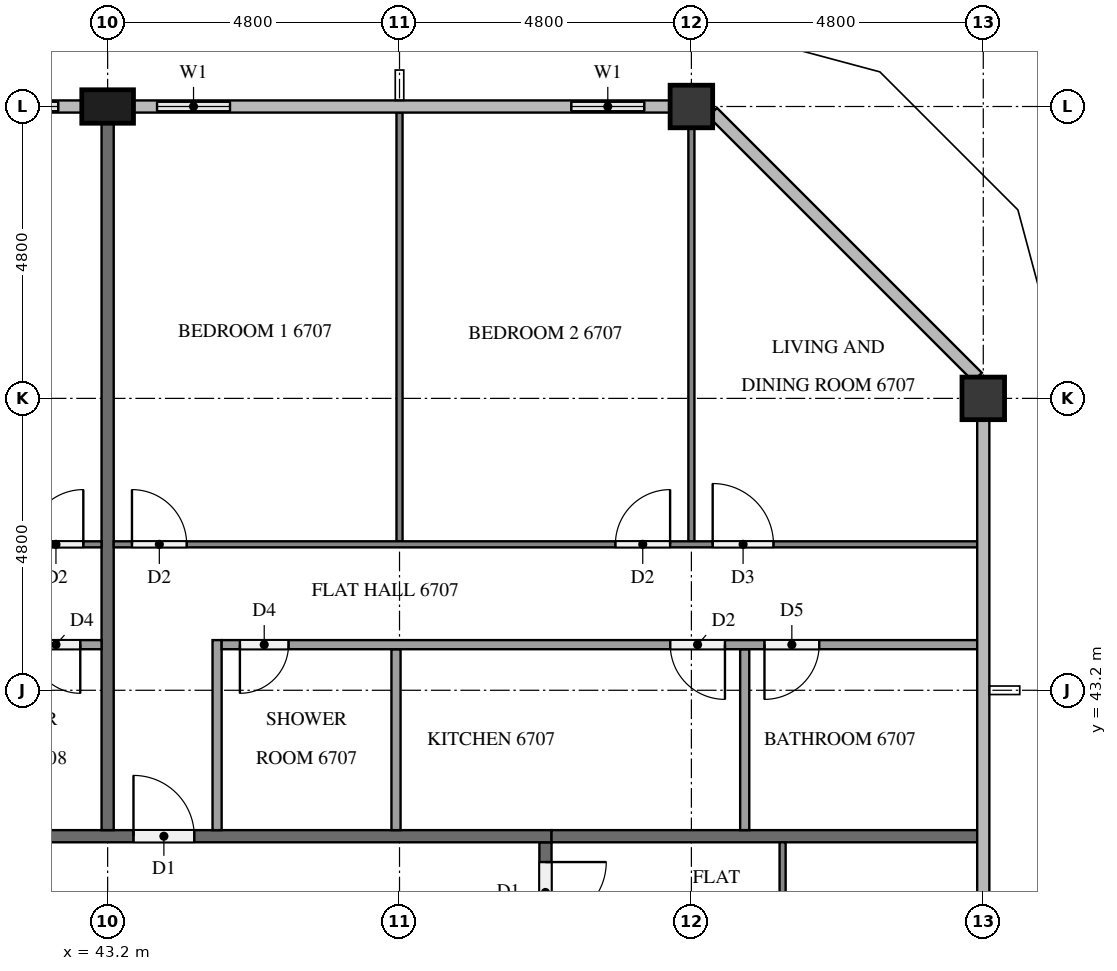
"""IFC4 building model, lengths in metres.
Left out: names, types, materials, properties, quantities, classifications, styles, units other than length and angle.
Written with IfcOpenShell. Run it as: python <this file> out.ifc"""

import sys

from ifc_helpers import new_model, si_unit, direction, frame, frame_2d, origin, origin_2d, place, context, subcontext, project, spatial, rectangle, extrude, element, fill, save


model = new_model("IFC4")
c1 = context("Model", 3, precision=1e-05, world=origin(), true_north=direction((0.0, 1.0)))
c2 = subcontext(c1, "Body", "Model", "MODEL_VIEW")
j1 = project(units=[si_unit("LENGTHUNIT", "METRE"), si_unit("PLANEANGLEUNIT", "RADIAN")], contexts=[c1])
p1 = place(None, origin())
s1 = spatial("IfcSite", under=j1, at=p1, CompositionType="ELEMENT")
p2 = place(p1, origin())
s2 = spatial("IfcBuilding", under=s1, at=p2, CompositionType="ELEMENT")
p3 = place(p2, frame((0.0, 0.0, 256.2)))
s3 = spatial("IfcBuildingStorey", under=s2, at=p3, CompositionType="ELEMENT", Elevation=256.2)
for number, where, z_axis, x_axis in (
    (1, (57.6, 48.0, 0.0), (0.0, 0.0, 1.0), (1.0, 0.0, 0.0)),
    (2, (52.8, 52.8, 0.0), (0.0, 0.0, 1.0), (1.0, 0.0, 0.0)),
):
    element("IfcColumn", number, at=place(p3, frame(where, z_axis=z_axis, x_axis=x_axis)), inside=s3, PredefinedType="COLUMN", context=c2, shape_type="SweptSolid", body=[
        extrude(rectangle(XDim=0.7, YDim=0.7, at=origin_2d()), origin(), (0.0, 0.0, 1.0), 3.2),
    ])
p4 = place(p3, frame((43.2, 52.8, 0.0), z_axis=(0.0, 0.0, 1.0), x_axis=(1.0, 0.0, 0.0)))
e3 = element("IfcColumn", 3, at=p4, inside=s3, PredefinedType="COLUMN", context=c2, shape_type="SweptSolid", body=[
    extrude(rectangle(XDim=0.85, YDim=0.55, at=origin_2d()), origin(), (0.0, 0.0, 1.0), 3.2),
])
p5 = place(p3, frame((52.45, 52.8, 0.0), z_axis=(0.0, 0.0, 1.0), x_axis=(-1.0, 0.0, 0.0)))
e4 = element("IfcWall", 4, at=p5, inside=s3, PredefinedType="SOLIDWALL", context=c2, shape_type="SweptSolid", body=[
    extrude(rectangle(XDim=2.05, YDim=0.15, at=frame_2d((1.025, 0.0))), origin(), (0.0, 0.0, 1.0), 3.2),
])
p6 = place(p5, frame((0.425, 0.0, 0.9)))
e5 = element("IfcOpeningElement", 5, at=p6, cuts=e4, PredefinedType="OPENING", context=c2, shape_type="SweptSolid", body=[
    extrude(rectangle(XDim=1.2, YDim=1.4, at=frame_2d((0.6, 0.7))), frame((0.0, 0.085, 0.0), z_axis=(0.0, -1.0, 0.0), x_axis=(1.0, 0.0, 0.0)), (0.0, 0.0, 1.0), 0.17),
])
p7 = place(p3, frame((45.6, 52.8, 0.0), z_axis=(0.0, 0.0, 1.0), x_axis=(-1.0, 0.0, 0.0)))
e6 = element("IfcWall", 6, at=p7, inside=s3, PredefinedType="SOLIDWALL", context=c2, shape_type="SweptSolid", body=[
    extrude(rectangle(XDim=1.975, YDim=0.15, at=frame_2d((0.988, 0.0))), origin(), (0.0, 0.0, 1.0), 3.2),
])
p8 = place(p7, frame((0.387, 0.0, 0.9)))
e7 = element("IfcOpeningElement", 7, at=p8, cuts=e6, PredefinedType="OPENING", context=c2, shape_type="SweptSolid", body=[
    extrude(rectangle(XDim=1.2, YDim=1.4, at=frame_2d((0.6, 0.7))), frame((0.0, 0.085, 0.0), z_axis=(0.0, -1.0, 0.0), x_axis=(1.0, 0.0, 0.0)), (0.0, 0.0, 1.0), 0.17),
])
p9 = place(p3, frame((42.775, 52.8, 0.0), z_axis=(0.0, 0.0, 1.0), x_axis=(-1.0, 0.0, 0.0)))
e8 = element("IfcWall", 8, at=p9, inside=s3, PredefinedType="SOLIDWALL", context=c2, shape_type="SweptSolid", body=[
    extrude(rectangle(XDim=1.975, YDim=0.15, at=frame_2d((0.987, 0.0))), origin(), (0.0, 0.0, 1.0), 3.2),
])
p10 = place(p9, frame((0.387, 0.0, 0.9)))
e9 = element("IfcOpeningElement", 9, at=p10, cuts=e8, PredefinedType="OPENING", context=c2, shape_type="SweptSolid", body=[
    extrude(rectangle(XDim=1.2, YDim=1.4, at=frame_2d((0.6, 0.7))), frame((0.0, 0.085, 0.0), z_axis=(0.0, -1.0, 0.0), x_axis=(1.0, 0.0, 0.0)), (0.0, 0.0, 1.0), 0.17),
])
p11 = place(p3, frame((50.4, 40.7, 0.0), z_axis=(0.0, 0.0, 1.0), x_axis=(0.0, -1.0, 0.0)))
e10 = element("IfcWall", 10, at=p11, inside=s3, PredefinedType="PARTITIONING", context=c2, shape_type="SweptSolid", body=[
    extrude(rectangle(XDim=28.6, YDim=0.2, at=frame_2d((14.3, 0.0))), origin(), (0.0, 0.0, 1.0), 3.2),
])
p12 = place(p11, frame((19.525, 0.0, 0.0)))
e11 = element("IfcOpeningElement", 11, at=p12, cuts=e10, PredefinedType="OPENING", context=c2, shape_type="SweptSolid", body=[
    extrude(rectangle(XDim=1.0, YDim=2.1, at=frame_2d((0.5, 1.05))), frame((0.0, 0.11, 0.0), z_axis=(0.0, -1.0, 0.0), x_axis=(1.0, 0.0, 0.0)), (0.0, 0.0, 1.0), 0.22),
])
p13 = place(p11, frame((17.675, 0.0, 0.0)))
e12 = element("IfcOpeningElement", 12, at=p13, cuts=e10, PredefinedType="OPENING", context=c2, shape_type="SweptSolid", body=[
    extrude(rectangle(XDim=1.0, YDim=2.1, at=frame_2d((0.5, 1.05))), frame((0.0, 0.11, 0.0), z_axis=(0.0, -1.0, 0.0), x_axis=(1.0, 0.0, 0.0)), (0.0, 0.0, 1.0), 0.22),
])
p14 = place(p11, frame((0.325, 0.0, 0.0)))
e13 = element("IfcOpeningElement", 13, at=p14, cuts=e10, PredefinedType="OPENING", context=c2, shape_type="SweptSolid", body=[
    extrude(rectangle(XDim=1.0, YDim=2.1, at=frame_2d((0.5, 1.05))), frame((0.0, 0.11, 0.0), z_axis=(0.0, -1.0, 0.0), x_axis=(1.0, 0.0, 0.0)), (0.0, 0.0, 1.0), 0.22),
])
p15 = place(p3, frame((11.9, 40.8, 0.0), z_axis=(0.0, 0.0, 1.0), x_axis=(1.0, 0.0, 0.0)))
e14 = element("IfcWall", 14, at=p15, inside=s3, PredefinedType="PARTITIONING", context=c2, shape_type="SweptSolid", body=[
    extrude(rectangle(XDim=38.6, YDim=0.2, at=frame_2d((19.3, 0.0))), origin(), (0.0, 0.0, 1.0), 3.2),
])
p16 = place(p15, frame((31.725, 0.0, 0.0)))
e15 = element("IfcOpeningElement", 15, at=p16, cuts=e14, PredefinedType="OPENING", context=c2, shape_type="SweptSolid", body=[
    extrude(rectangle(XDim=1.0, YDim=2.1, at=frame_2d((0.5, 1.05))), frame((0.0, 0.11, 0.0), z_axis=(0.0, -1.0, 0.0), x_axis=(1.0, 0.0, 0.0)), (0.0, 0.0, 1.0), 0.22),
])
p17 = place(p15, frame((17.325, 0.0, 0.0)))
e16 = element("IfcOpeningElement", 16, at=p17, cuts=e14, PredefinedType="OPENING", context=c2, shape_type="SweptSolid", body=[
    extrude(rectangle(XDim=1.0, YDim=2.1, at=frame_2d((0.5, 1.05))), frame((0.0, 0.11, 0.0), z_axis=(0.0, -1.0, 0.0), x_axis=(1.0, 0.0, 0.0)), (0.0, 0.0, 1.0), 0.22),
])
p18 = place(p15, frame((0.525, 0.0, 0.0)))
e17 = element("IfcOpeningElement", 17, at=p18, cuts=e14, PredefinedType="OPENING", context=c2, shape_type="SweptSolid", body=[
    extrude(rectangle(XDim=1.0, YDim=2.1, at=frame_2d((0.5, 1.05))), frame((0.0, 0.11, 0.0), z_axis=(0.0, -1.0, 0.0), x_axis=(1.0, 0.0, 0.0)), (0.0, 0.0, 1.0), 0.22),
])
p19 = place(p3, frame((50.5, 40.8, 0.0), z_axis=(0.0, 0.0, 1.0), x_axis=(1.0, 0.0, 0.0)))
e18 = element("IfcWall", 18, at=p19, inside=s3, PredefinedType="PARTITIONING", context=c2, shape_type="SweptSolid", body=[
    extrude(rectangle(XDim=7.0, YDim=0.2, at=frame_2d((3.5, 0.0))), origin(), (0.0, 0.0, 1.0), 3.2),
])
p20 = place(p3, frame((43.2, 52.525, 0.0), z_axis=(0.0, 0.0, 1.0), x_axis=(0.0, -1.0, 0.0)))
e19 = element("IfcWall", 19, at=p20, inside=s3, PredefinedType="PARTITIONING", context=c2, shape_type="SweptSolid", body=[
    extrude(rectangle(XDim=11.625, YDim=0.2, at=frame_2d((5.812, 0.0))), origin(), (0.0, 0.0, 1.0), 3.2),
])
p21 = place(p3, frame((54.3, 40.7, 0.0), z_axis=(0.0, 0.0, 1.0), x_axis=(0.0, -1.0, 0.0)))
e20 = element("IfcWall", 20, at=p21, inside=s3, PredefinedType="PARTITIONING", context=c2, shape_type="SweptSolid", body=[
    extrude(rectangle(XDim=9.4, YDim=0.1, at=frame_2d((4.7, 0.0))), origin(), (0.0, 0.0, 1.0), 3.2),
])
p22 = place(p21, frame((3.45, 0.0, 0.0)))
e21 = element("IfcOpeningElement", 21, at=p22, cuts=e20, PredefinedType="OPENING", context=c2, shape_type="SweptSolid", body=[
    extrude(rectangle(XDim=0.9, YDim=2.1, at=frame_2d((0.45, 1.05))), frame((0.0, 0.06, 0.0), z_axis=(0.0, -1.0, 0.0), x_axis=(1.0, 0.0, 0.0)), (0.0, 0.0, 1.0), 0.12),
])
p23 = place(p21, frame((5.05, 0.0, 0.0)))
e22 = element("IfcOpeningElement", 22, at=p23, cuts=e20, PredefinedType="OPENING", context=c2, shape_type="SweptSolid", body=[
    extrude(rectangle(XDim=1.0, YDim=2.1, at=frame_2d((0.5, 1.05))), frame((0.0, 0.06, 0.0), z_axis=(0.0, -1.0, 0.0), x_axis=(1.0, 0.0, 0.0)), (0.0, 0.0, 1.0), 0.12),
])
p24 = place(p3, frame((48.0, 45.65, 0.0), z_axis=(0.0, 0.0, 1.0), x_axis=(0.0, 1.0, 0.0)))
e23 = element("IfcWall", 23, at=p24, inside=s3, PredefinedType="PARTITIONING", context=c2, shape_type="SweptSolid", body=[
    extrude(rectangle(XDim=7.05, YDim=0.1, at=frame_2d((3.525, 0.0))), origin(), (0.0, 0.0, 1.0), 3.2),
])
p25 = place(p3, frame((52.8, 45.65, 0.0), z_axis=(0.0, 0.0, 1.0), x_axis=(0.0, 1.0, 0.0)))
e24 = element("IfcWall", 24, at=p25, inside=s3, PredefinedType="PARTITIONING", context=c2, shape_type="SweptSolid", body=[
    extrude(rectangle(XDim=6.8, YDim=0.1, at=frame_2d((3.4, 0.0))), origin(), (0.0, 0.0, 1.0), 3.2),
])
p26 = place(p3, frame((43.3, 45.6, 0.0), z_axis=(0.0, 0.0, 1.0), x_axis=(1.0, 0.0, 0.0)))
e25 = element("IfcWall", 25, at=p26, inside=s3, PredefinedType="PARTITIONING", context=c2, shape_type="SweptSolid", body=[
    extrude(rectangle(XDim=14.2, YDim=0.1, at=frame_2d((7.1, 0.0))), origin(), (0.0, 0.0, 1.0), 3.2),
])
p27 = place(p26, frame((0.3, 0.0, 0.0)))
e26 = element("IfcOpeningElement", 26, at=p27, cuts=e25, PredefinedType="OPENING", context=c2, shape_type="SweptSolid", body=[
    extrude(rectangle(XDim=0.9, YDim=2.1, at=frame_2d((0.45, 1.05))), frame((0.0, 0.06, 0.0), z_axis=(0.0, -1.0, 0.0), x_axis=(1.0, 0.0, 0.0)), (0.0, 0.0, 1.0), 0.12),
])
p28 = place(p26, frame((8.25, 0.0, 0.0)))
e27 = element("IfcOpeningElement", 27, at=p28, cuts=e25, PredefinedType="OPENING", context=c2, shape_type="SweptSolid", body=[
    extrude(rectangle(XDim=0.9, YDim=2.1, at=frame_2d((0.45, 1.05))), frame((0.0, 0.06, 0.0), z_axis=(0.0, -1.0, 0.0), x_axis=(1.0, 0.0, 0.0)), (0.0, 0.0, 1.0), 0.12),
])
p29 = place(p26, frame((9.85, 0.0, 0.0)))
e28 = element("IfcOpeningElement", 28, at=p29, cuts=e25, PredefinedType="OPENING", context=c2, shape_type="SweptSolid", body=[
    extrude(rectangle(XDim=1.0, YDim=2.1, at=frame_2d((0.5, 1.05))), frame((0.0, 0.06, 0.0), z_axis=(0.0, -1.0, 0.0), x_axis=(1.0, 0.0, 0.0)), (0.0, 0.0, 1.0), 0.12),
])
for number, where, z_axis, x_axis in (
    (29, (47.942, 40.9, 0.0), (0.0, 0.0, 1.0), (0.0, 1.0, 0.0)),
    (30, (53.677, 40.9, 0.0), (0.0, 0.0, 1.0), (0.0, 1.0, 0.0)),
):
    element("IfcWall", number, at=place(p3, frame(where, z_axis=z_axis, x_axis=x_axis)), inside=s3, PredefinedType="PARTITIONING", context=c2, shape_type="SweptSolid", body=[
        extrude(rectangle(XDim=2.975, YDim=0.15, at=frame_2d((1.488, 0.0))), origin(), (0.0, 0.0, 1.0), 3.2),
    ])
p30 = place(p3, frame((45.0, 40.9, 0.0), z_axis=(0.0, 0.0, 1.0), x_axis=(0.0, 1.0, 0.0)))
e31 = element("IfcWall", 31, at=p30, inside=s3, PredefinedType="PARTITIONING", context=c2, shape_type="SweptSolid", body=[
    extrude(rectangle(XDim=3.125, YDim=0.15, at=frame_2d((1.562, 0.0))), origin(), (0.0, 0.0, 1.0), 3.2),
])
p31 = place(p3, frame((57.5, 43.95, 0.0), z_axis=(0.0, 0.0, 1.0), x_axis=(-1.0, 0.0, 0.0)))
e32 = element("IfcWall", 32, at=p31, inside=s3, PredefinedType="PARTITIONING", context=c2, shape_type="SweptSolid", body=[
    extrude(rectangle(XDim=12.425, YDim=0.15, at=frame_2d((6.212, 0.0))), origin(), (0.0, 0.0, 1.0), 3.2),
])
p32 = place(p31, frame((11.325, 0.0, 0.0)))
e33 = element("IfcOpeningElement", 33, at=p32, cuts=e32, PredefinedType="OPENING", context=c2, shape_type="SweptSolid", body=[
    extrude(rectangle(XDim=0.8, YDim=2.1, at=frame_2d((0.4, 1.05))), frame((0.0, 0.085, 0.0), z_axis=(0.0, -1.0, 0.0), x_axis=(1.0, 0.0, 0.0)), (0.0, 0.0, 1.0), 0.17),
])
p33 = place(p31, frame((4.148, 0.0, 0.0)))
e34 = element("IfcOpeningElement", 34, at=p33, cuts=e32, PredefinedType="OPENING", context=c2, shape_type="SweptSolid", body=[
    extrude(rectangle(XDim=0.9, YDim=2.1, at=frame_2d((0.45, 1.05))), frame((0.0, 0.085, 0.0), z_axis=(0.0, -1.0, 0.0), x_axis=(1.0, 0.0, 0.0)), (0.0, 0.0, 1.0), 0.17),
])
p34 = place(p31, frame((2.598, 0.0, 0.0)))
e35 = element("IfcOpeningElement", 35, at=p34, cuts=e32, PredefinedType="OPENING", context=c2, shape_type="SweptSolid", body=[
    extrude(rectangle(XDim=0.9, YDim=2.1, at=frame_2d((0.45, 1.05))), frame((0.0, 0.085, 0.0), z_axis=(0.0, -1.0, 0.0), x_axis=(1.0, 0.0, 0.0)), (0.0, 0.0, 1.0), 0.17),
])
p35 = place(p3, frame((28.9, 45.6, 0.0), z_axis=(0.0, 0.0, 1.0), x_axis=(1.0, 0.0, 0.0)))
e36 = element("IfcWall", 36, at=p35, inside=s3, PredefinedType="PARTITIONING", context=c2, shape_type="SweptSolid", body=[
    extrude(rectangle(XDim=14.2, YDim=0.1, at=frame_2d((7.1, 0.0))), origin(), (0.0, 0.0, 1.0), 3.2),
])
p36 = place(p35, frame((3.35, 0.0, 0.0)))
e37 = element("IfcOpeningElement", 37, at=p36, cuts=e36, PredefinedType="OPENING", context=c2, shape_type="SweptSolid", body=[
    extrude(rectangle(XDim=1.0, YDim=2.1, at=frame_2d((0.5, 1.05))), frame((0.0, 0.06, 0.0), z_axis=(0.0, -1.0, 0.0), x_axis=(1.0, 0.0, 0.0)), (0.0, 0.0, 1.0), 0.12),
])
p37 = place(p35, frame((5.05, 0.0, 0.0)))
e38 = element("IfcOpeningElement", 38, at=p37, cuts=e36, PredefinedType="OPENING", context=c2, shape_type="SweptSolid", body=[
    extrude(rectangle(XDim=0.9, YDim=2.1, at=frame_2d((0.45, 1.05))), frame((0.0, 0.06, 0.0), z_axis=(0.0, -1.0, 0.0), x_axis=(1.0, 0.0, 0.0)), (0.0, 0.0, 1.0), 0.12),
])
p38 = place(p35, frame((13.0, 0.0, 0.0)))
e39 = element("IfcOpeningElement", 39, at=p38, cuts=e36, PredefinedType="OPENING", context=c2, shape_type="SweptSolid", body=[
    extrude(rectangle(XDim=0.9, YDim=2.1, at=frame_2d((0.45, 1.05))), frame((0.0, 0.06, 0.0), z_axis=(0.0, -1.0, 0.0), x_axis=(1.0, 0.0, 0.0)), (0.0, 0.0, 1.0), 0.12),
])
p39 = place(p3, frame((43.1, 43.95, 0.0), z_axis=(0.0, 0.0, 1.0), x_axis=(-1.0, 0.0, 0.0)))
e40 = element("IfcWall", 40, at=p39, inside=s3, PredefinedType="PARTITIONING", context=c2, shape_type="SweptSolid", body=[
    extrude(rectangle(XDim=12.425, YDim=0.15, at=frame_2d((6.212, 0.0))), origin(), (0.0, 0.0, 1.0), 3.2),
])
p40 = place(p39, frame((7.015, 0.0, 0.0)))
e41 = element("IfcOpeningElement", 41, at=p40, cuts=e40, PredefinedType="OPENING", context=c2, shape_type="SweptSolid", body=[
    extrude(rectangle(XDim=0.9, YDim=2.1, at=frame_2d((0.45, 1.05))), frame((0.0, 0.085, 0.0), z_axis=(0.0, -1.0, 0.0), x_axis=(1.0, 0.0, 0.0)), (0.0, 0.0, 1.0), 0.17),
])
p41 = place(p39, frame((5.465, 0.0, 0.0)))
e42 = element("IfcOpeningElement", 42, at=p41, cuts=e40, PredefinedType="OPENING", context=c2, shape_type="SweptSolid", body=[
    extrude(rectangle(XDim=0.9, YDim=2.1, at=frame_2d((0.45, 1.05))), frame((0.0, 0.085, 0.0), z_axis=(0.0, -1.0, 0.0), x_axis=(1.0, 0.0, 0.0)), (0.0, 0.0, 1.0), 0.17),
])
p42 = place(p39, frame((0.35, 0.0, 0.0)))
e43 = element("IfcOpeningElement", 43, at=p42, cuts=e40, PredefinedType="OPENING", context=c2, shape_type="SweptSolid", body=[
    extrude(rectangle(XDim=0.8, YDim=2.1, at=frame_2d((0.4, 1.05))), frame((0.0, 0.085, 0.0), z_axis=(0.0, -1.0, 0.0), x_axis=(1.0, 0.0, 0.0)), (0.0, 0.0, 1.0), 0.17),
])
p43 = place(p6, origin())
e44 = element("IfcWindow", 44, at=p43, inside=s3, PartitioningType="SINGLE_PANEL", PredefinedType="WINDOW", context=c2, shape_type="SweptSolid", body=[
    extrude(rectangle(XDim=1.2, YDim=1.4, at=frame_2d((0.6, 0.7))), frame((0.0, 0.03, 0.0), z_axis=(0.0, -1.0, 0.0), x_axis=(1.0, 0.0, 0.0)), (0.0, 0.0, 1.0), 0.06),
])
fill(e5, e44)
p44 = place(p8, origin())
e45 = element("IfcWindow", 45, at=p44, inside=s3, PartitioningType="SINGLE_PANEL", PredefinedType="WINDOW", context=c2, shape_type="SweptSolid", body=[
    extrude(rectangle(XDim=1.2, YDim=1.4, at=frame_2d((0.6, 0.7))), frame((0.0, 0.03, 0.0), z_axis=(0.0, -1.0, 0.0), x_axis=(1.0, 0.0, 0.0)), (0.0, 0.0, 1.0), 0.06),
])
fill(e7, e45)
p45 = place(p10, origin())
e46 = element("IfcWindow", 46, at=p45, inside=s3, PartitioningType="SINGLE_PANEL", PredefinedType="WINDOW", context=c2, shape_type="SweptSolid", body=[
    extrude(rectangle(XDim=1.2, YDim=1.4, at=frame_2d((0.6, 0.7))), frame((0.0, 0.03, 0.0), z_axis=(0.0, -1.0, 0.0), x_axis=(1.0, 0.0, 0.0)), (0.0, 0.0, 1.0), 0.06),
])
fill(e9, e46)
p46 = place(p14, origin())
e47 = element("IfcDoor", 47, at=p46, inside=s3, OperationType="SINGLE_SWING_LEFT", PredefinedType="DOOR", context=c2, shape_type="SweptSolid", body=[
    extrude(rectangle(XDim=1.0, YDim=2.1, at=frame_2d((0.5, 1.05))), frame((0.0, 0.025, 0.0), z_axis=(0.0, -1.0, 0.0), x_axis=(1.0, 0.0, 0.0)), (0.0, 0.0, 1.0), 0.05),
])
fill(e13, e47)
p47 = place(p16, origin())
e48 = element("IfcDoor", 48, at=p47, inside=s3, OperationType="SINGLE_SWING_LEFT", PredefinedType="DOOR", context=c2, shape_type="SweptSolid", body=[
    extrude(rectangle(XDim=1.0, YDim=2.1, at=frame_2d((0.5, 1.05))), frame((0.0, 0.025, 0.0), z_axis=(0.0, -1.0, 0.0), x_axis=(1.0, 0.0, 0.0)), (0.0, 0.0, 1.0), 0.05),
])
fill(e15, e48)
p48 = place(p27, origin())
e49 = element("IfcDoor", 49, at=p48, inside=s3, OperationType="SINGLE_SWING_LEFT", PredefinedType="DOOR", context=c2, shape_type="SweptSolid", body=[
    extrude(rectangle(XDim=0.9, YDim=2.1, at=frame_2d((0.45, 1.05))), frame((0.0, 0.025, 0.0), z_axis=(0.0, -1.0, 0.0), x_axis=(1.0, 0.0, 0.0)), (0.0, 0.0, 1.0), 0.05),
])
fill(e26, e49)
p49 = place(p28, origin())
e50 = element("IfcDoor", 50, at=p49, inside=s3, OperationType="SINGLE_SWING_RIGHT", PredefinedType="DOOR", context=c2, shape_type="SweptSolid", body=[
    extrude(rectangle(XDim=0.9, YDim=2.1, at=frame_2d((0.45, 1.05))), frame((0.0, 0.025, 0.0), z_axis=(0.0, -1.0, 0.0), x_axis=(1.0, 0.0, 0.0)), (0.0, 0.0, 1.0), 0.05),
])
fill(e27, e50)
p50 = place(p29, origin())
e51 = element("IfcDoor", 51, at=p50, inside=s3, OperationType="SINGLE_SWING_LEFT", PredefinedType="DOOR", context=c2, shape_type="SweptSolid", body=[
    extrude(rectangle(XDim=1.0, YDim=2.1, at=frame_2d((0.5, 1.05))), frame((0.0, 0.025, 0.0), z_axis=(0.0, -1.0, 0.0), x_axis=(1.0, 0.0, 0.0)), (0.0, 0.0, 1.0), 0.05),
])
fill(e28, e51)
p51 = place(p32, origin())
e52 = element("IfcDoor", 52, at=p51, inside=s3, OperationType="SINGLE_SWING_RIGHT", PredefinedType="DOOR", context=c2, shape_type="SweptSolid", body=[
    extrude(rectangle(XDim=0.8, YDim=2.1, at=frame_2d((0.4, 1.05))), frame((0.0, 0.025, 0.0), z_axis=(0.0, -1.0, 0.0), x_axis=(1.0, 0.0, 0.0)), (0.0, 0.0, 1.0), 0.05),
])
fill(e33, e52)
p52 = place(p33, origin())
e53 = element("IfcDoor", 53, at=p52, inside=s3, OperationType="SINGLE_SWING_LEFT", PredefinedType="DOOR", context=c2, shape_type="SweptSolid", body=[
    extrude(rectangle(XDim=0.9, YDim=2.1, at=frame_2d((0.45, 1.05))), frame((0.0, 0.025, 0.0), z_axis=(0.0, -1.0, 0.0), x_axis=(1.0, 0.0, 0.0)), (0.0, 0.0, 1.0), 0.05),
])
fill(e34, e53)
p53 = place(p34, origin())
e54 = element("IfcDoor", 54, at=p53, inside=s3, OperationType="SINGLE_SWING_RIGHT", PredefinedType="DOOR", context=c2, shape_type="SweptSolid", body=[
    extrude(rectangle(XDim=0.9, YDim=2.1, at=frame_2d((0.45, 1.05))), frame((0.0, 0.025, 0.0), z_axis=(0.0, -1.0, 0.0), x_axis=(1.0, 0.0, 0.0)), (0.0, 0.0, 1.0), 0.05),
])
fill(e35, e54)
p54 = place(p38, origin())
e55 = element("IfcDoor", 55, at=p54, inside=s3, OperationType="SINGLE_SWING_RIGHT", PredefinedType="DOOR", context=c2, shape_type="SweptSolid", body=[
    extrude(rectangle(XDim=0.9, YDim=2.1, at=frame_2d((0.45, 1.05))), frame((0.0, 0.025, 0.0), z_axis=(0.0, -1.0, 0.0), x_axis=(1.0, 0.0, 0.0)), (0.0, 0.0, 1.0), 0.05),
])
fill(e39, e55)
p55 = place(p42, origin())
e56 = element("IfcDoor", 56, at=p55, inside=s3, OperationType="SINGLE_SWING_LEFT", PredefinedType="DOOR", context=c2, shape_type="SweptSolid", body=[
    extrude(rectangle(XDim=0.8, YDim=2.1, at=frame_2d((0.4, 1.05))), frame((0.0, 0.025, 0.0), z_axis=(0.0, -1.0, 0.0), x_axis=(1.0, 0.0, 0.0)), (0.0, 0.0, 1.0), 0.05),
])
fill(e43, e56)
save(model, sys.argv[1])
